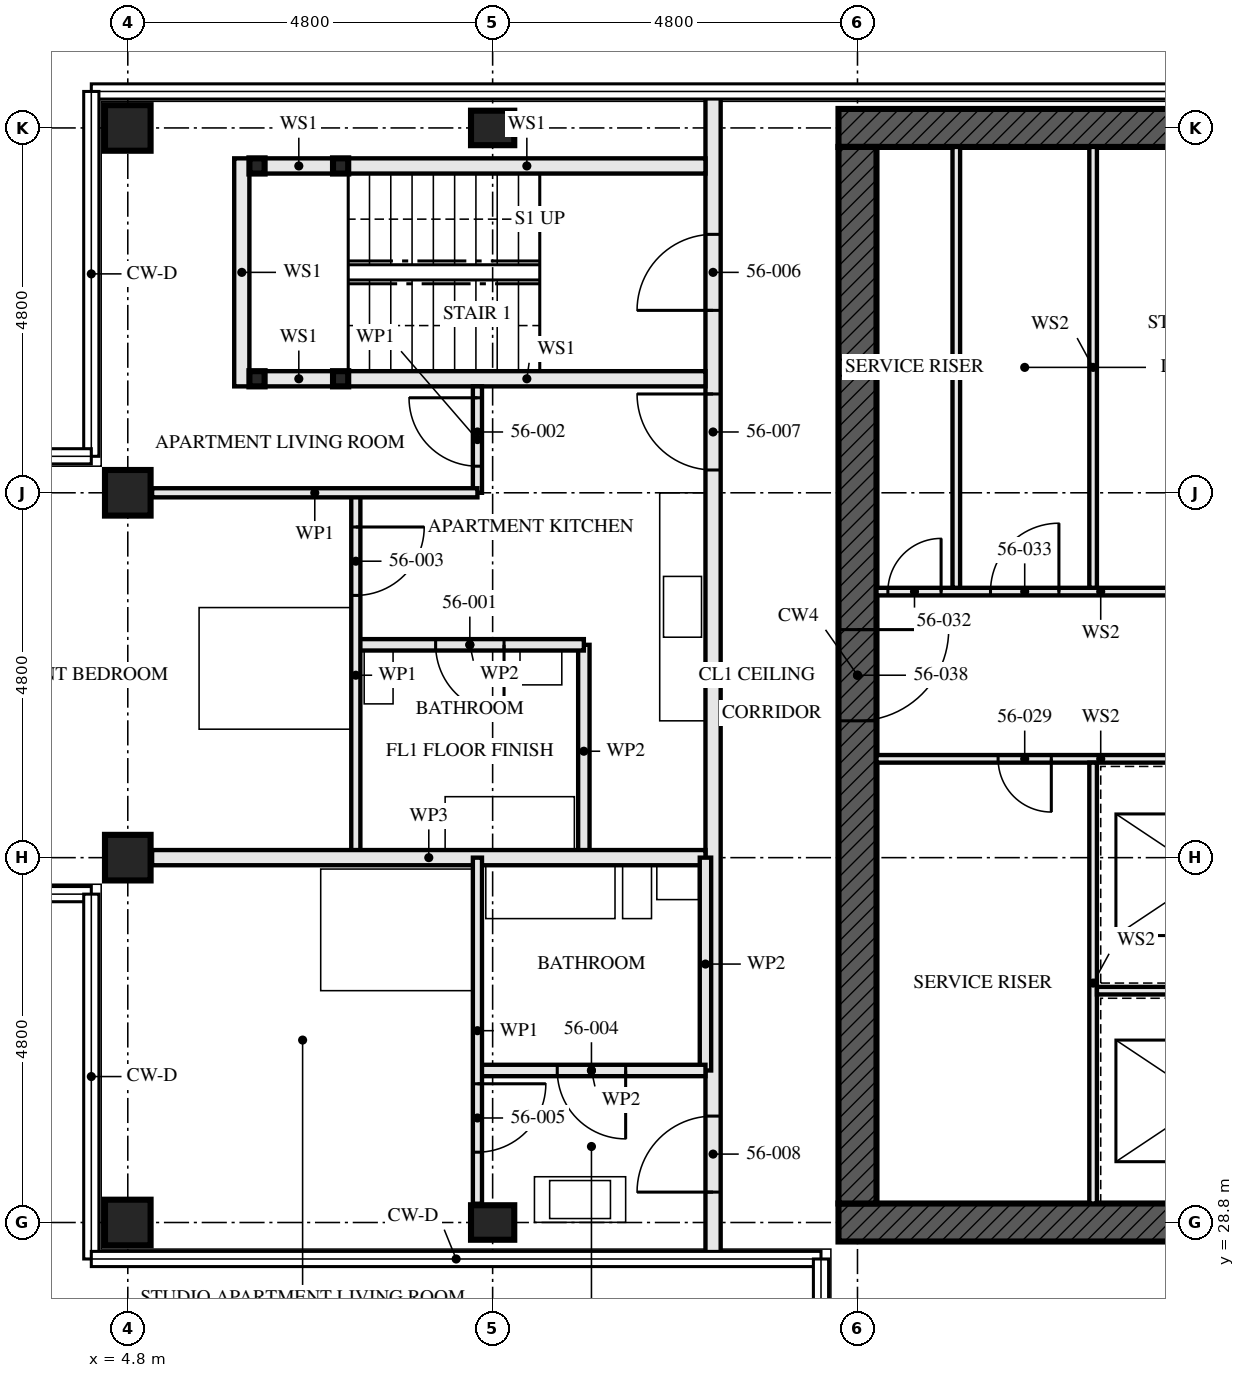
"""IFC4 building model, lengths in metres.
Left out: names, types, materials, properties, quantities, classifications, styles, units other than length and angle.
Written with IfcOpenShell. Run it as: python <this file> out.ifc"""

import sys

from ifc_helpers import new_model, si_unit, direction, frame, frame_2d, origin, origin_2d, place, context, subcontext, project, spatial, rectangle, hollow_rectangle, i_section, extrude, element, fill, save


model = new_model("IFC4")
c1 = context("Model", 3, precision=1e-05, world=origin(), true_north=direction((0.0, 1.0)))
c2 = subcontext(c1, "Body", "Model", "MODEL_VIEW")
j1 = project(units=[si_unit("LENGTHUNIT", "METRE"), si_unit("PLANEANGLEUNIT", "RADIAN")], contexts=[c1])
p1 = place(None, origin())
s1 = spatial("IfcSite", under=j1, at=p1, CompositionType="ELEMENT")
p2 = place(p1, origin())
s2 = spatial("IfcBuilding", under=s1, at=p2, CompositionType="ELEMENT")
p3 = place(p2, frame((0.0, 0.0, 205.0)))
s3 = spatial("IfcBuildingStorey", under=s2, at=p3, CompositionType="ELEMENT", Elevation=205.0)
for number, where, z_axis, x_axis in (
    (1, (4.8, 28.8, 0.0), (0.0, 0.0, 1.0), (0.0, 1.0, 0.0)),
    (2, (4.8, 33.6, 0.0), (0.0, 0.0, 1.0), (0.0, 1.0, 0.0)),
    (3, (4.8, 38.4, 0.0), (0.0, 0.0, 1.0), (0.0, 1.0, 0.0)),
    (4, (4.8, 43.2, 0.0), (0.0, 0.0, 1.0), (0.0, 1.0, 0.0)),
):
    element("IfcColumn", number, at=place(p3, frame(where, z_axis=z_axis, x_axis=x_axis)), inside=s3, PredefinedType="COLUMN", context=c2, shape_type="SweptSolid", body=[
        extrude(hollow_rectangle(XDim=0.6, YDim=0.6, WallThickness=0.05, at=origin_2d()), origin(), (0.0, 0.0, 1.0), 3.5),
    ])
for number, where, z_axis, x_axis in (
    (5, (9.6, 28.8, 0.0), (0.0, 0.0, 1.0), (0.0, 1.0, 0.0)),
    (6, (9.6, 43.2, 0.0), (0.0, 0.0, 1.0), (0.0, 1.0, 0.0)),
):
    element("IfcColumn", number, at=place(p3, frame(where, z_axis=z_axis, x_axis=x_axis)), inside=s3, PredefinedType="COLUMN", context=c2, shape_type="SweptSolid", body=[
        extrude(i_section(OverallWidth=0.454, OverallDepth=0.569, WebThickness=0.078, FlangeThickness=0.125, FilletRadius=0.015, at=origin_2d()), origin(), (0.0, 0.0, 1.0), 3.5),
    ])
p4 = place(p3, frame((14.15, 28.8, -0.17), z_axis=(0.0, 0.0, 1.0), x_axis=(1.0, 0.0, 0.0)))
e7 = element("IfcWall", 7, at=p4, inside=s3, PredefinedType="SHEAR", context=c2, shape_type="SweptSolid", body=[
    extrude(rectangle(XDim=14.9, YDim=0.5, at=frame_2d((7.45, 0.0))), origin(), (0.0, 0.0, 1.0), 3.5),
])
p5 = place(p4, frame((6.85, 0.0, 0.17)))
e8 = element("IfcOpeningElement", 8, at=p5, cuts=e7, PredefinedType="OPENING", context=c2, shape_type="SweptSolid", body=[
    extrude(rectangle(XDim=1.2, YDim=2.1, at=frame_2d((0.6, 1.05))), frame((0.0, 0.26, 0.0), z_axis=(0.0, -1.0, 0.0), x_axis=(1.0, 0.0, 0.0)), (0.0, 0.0, 1.0), 0.521),
])
p6 = place(p3, frame((29.05, 43.2, -0.17), z_axis=(0.0, 0.0, 1.0), x_axis=(-1.0, 0.0, 0.0)))
e9 = element("IfcWall", 9, at=p6, inside=s3, PredefinedType="SHEAR", context=c2, shape_type="SweptSolid", body=[
    extrude(rectangle(XDim=14.9, YDim=0.5, at=frame_2d((7.45, 0.0))), origin(), (0.0, 0.0, 1.0), 3.5),
])
p7 = place(p3, frame((14.4, 42.95, -0.17), z_axis=(0.0, 0.0, 1.0), x_axis=(0.0, -1.0, 0.0)))
e10 = element("IfcWall", 10, at=p7, inside=s3, PredefinedType="SHEAR", context=c2, shape_type="SweptSolid", body=[
    extrude(rectangle(XDim=13.9, YDim=0.5, at=frame_2d((6.95, 0.0))), origin(), (0.0, 0.0, 1.0), 3.5),
])
p8 = place(p7, frame((6.35, 0.0, 0.17)))
e11 = element("IfcOpeningElement", 11, at=p8, cuts=e10, PredefinedType="OPENING", context=c2, shape_type="SweptSolid", body=[
    extrude(rectangle(XDim=1.2, YDim=2.1, at=frame_2d((0.6, 1.05))), frame((0.0, 0.26, 0.0), z_axis=(0.0, -1.0, 0.0), x_axis=(1.0, 0.0, 0.0)), (0.0, 0.0, 1.0), 0.521),
])
for number, where, z_axis, x_axis in (
    (12, (6.5, 42.7, 0.0), (0.0, 0.0, 1.0), (1.0, 0.0, 0.0)),
    (13, (6.5, 39.9, 0.0), (0.0, 0.0, 1.0), (1.0, 0.0, 0.0)),
    (14, (7.6, 42.7, 0.0), (0.0, 0.0, 1.0), (1.0, 0.0, 0.0)),
    (15, (7.6, 39.9, 0.0), (0.0, 0.0, 1.0), (1.0, 0.0, 0.0)),
):
    element("IfcColumn", number, at=place(p3, frame(where, z_axis=z_axis, x_axis=x_axis)), inside=s3, PredefinedType="COLUMN", context=c2, shape_type="SweptSolid", body=[
        extrude(hollow_rectangle(XDim=0.2, YDim=0.2, WallThickness=0.008, at=origin_2d()), origin(), (0.0, 0.0, 1.0), 3.33),
    ])
p9 = place(p3, frame((6.6, 42.7, 0.0), z_axis=(0.0, 0.0, 1.0), x_axis=(1.0, 0.0, 0.0)))
e16 = element("IfcWall", 16, at=p9, inside=s3, PredefinedType="SOLIDWALL", context=c2, shape_type="SweptSolid", body=[
    extrude(rectangle(XDim=0.9, YDim=0.2, at=frame_2d((0.45, 0.0))), origin(), (0.0, 0.0, 1.0), 2.99),
])
p10 = place(p3, frame((7.7, 42.7, 0.0), z_axis=(0.0, 0.0, 1.0), x_axis=(1.0, 0.0, 0.0)))
e17 = element("IfcWall", 17, at=p10, inside=s3, PredefinedType="SOLIDWALL", context=c2, shape_type="SweptSolid", body=[
    extrude(rectangle(XDim=4.7, YDim=0.2, at=frame_2d((2.35, 0.0))), origin(), (0.0, 0.0, 1.0), 2.99),
])
p11 = place(p3, frame((6.6, 39.9, 0.0), z_axis=(0.0, 0.0, 1.0), x_axis=(1.0, 0.0, 0.0)))
e18 = element("IfcWall", 18, at=p11, inside=s3, PredefinedType="SOLIDWALL", context=c2, shape_type="SweptSolid", body=[
    extrude(rectangle(XDim=0.9, YDim=0.2, at=frame_2d((0.45, 0.0))), origin(), (0.0, 0.0, 1.0), 2.99),
])
p12 = place(p3, frame((7.7, 39.9, 0.0), z_axis=(0.0, 0.0, 1.0), x_axis=(1.0, 0.0, 0.0)))
e19 = element("IfcWall", 19, at=p12, inside=s3, PredefinedType="SOLIDWALL", context=c2, shape_type="SweptSolid", body=[
    extrude(rectangle(XDim=4.7, YDim=0.2, at=frame_2d((2.35, 0.0))), origin(), (0.0, 0.0, 1.0), 2.99),
])
p13 = place(p3, frame((6.3, 42.8, 0.0), z_axis=(0.0, 0.0, 1.0), x_axis=(0.0, -1.0, 0.0)))
e20 = element("IfcWall", 20, at=p13, inside=s3, PredefinedType="SOLIDWALL", context=c2, shape_type="SweptSolid", body=[
    extrude(rectangle(XDim=3.0, YDim=0.2, at=frame_2d((1.5, 0.0))), origin(), (0.0, 0.0, 1.0), 3.33),
])
p14 = place(p3, frame((7.8, 36.4, 0.0), z_axis=(0.0, 0.0, 1.0), x_axis=(1.0, 0.0, 0.0)))
e21 = element("IfcWall", 21, at=p14, inside=s3, PredefinedType="PARTITIONING", context=c2, shape_type="SweptSolid", body=[
    extrude(rectangle(XDim=3.0, YDim=0.15, at=frame_2d((1.5, 0.0))), origin(), (0.0, 0.0, 1.0), 3.33),
])
p15 = place(p14, frame((1.05, 0.0, 0.0)))
e22 = element("IfcOpeningElement", 22, at=p15, cuts=e21, PredefinedType="OPENING", context=c2, shape_type="SweptSolid", body=[
    extrude(rectangle(XDim=0.9, YDim=2.1, at=frame_2d((0.45, 1.05))), frame((0.0, 0.085, 0.0), z_axis=(0.0, -1.0, 0.0), x_axis=(1.0, 0.0, 0.0)), (0.0, 0.0, 1.0), 0.171),
])
p16 = place(p3, frame((10.8, 36.4, 0.0), z_axis=(0.0, 0.0, 1.0), x_axis=(0.0, -1.0, 0.0)))
e23 = element("IfcWall", 23, at=p16, inside=s3, PredefinedType="PARTITIONING", context=c2, shape_type="SweptSolid", body=[
    extrude(rectangle(XDim=2.8, YDim=0.15, at=frame_2d((1.4, 0.0))), origin(), (0.0, 0.0, 1.0), 3.33),
])
p17 = place(p3, frame((9.4, 39.8, 0.0), z_axis=(0.0, 0.0, 1.0), x_axis=(0.0, -1.0, 0.0)))
e24 = element("IfcWall", 24, at=p17, inside=s3, PredefinedType="PARTITIONING", context=c2, shape_type="SweptSolid", body=[
    extrude(rectangle(XDim=1.4, YDim=0.12, at=frame_2d((0.7, 0.0))), origin(), (0.0, 0.0, 1.0), 3.33),
])
p18 = place(p17, frame((0.15, 0.0, 0.0)))
e25 = element("IfcOpeningElement", 25, at=p18, cuts=e24, PredefinedType="OPENING", context=c2, shape_type="SweptSolid", body=[
    extrude(rectangle(XDim=0.9, YDim=2.1, at=frame_2d((0.45, 1.05))), frame((0.0, 0.071, 0.0), z_axis=(0.0, -1.0, 0.0), x_axis=(1.0, 0.0, 0.0)), (0.0, 0.0, 1.0), 0.141),
])
p19 = place(p3, frame((7.8, 38.4, 0.0), z_axis=(0.0, 0.0, 1.0), x_axis=(0.0, -1.0, 0.0)))
e26 = element("IfcWall", 26, at=p19, inside=s3, PredefinedType="PARTITIONING", context=c2, shape_type="SweptSolid", body=[
    extrude(rectangle(XDim=4.8, YDim=0.12, at=frame_2d((2.4, 0.0))), origin(), (0.0, 0.0, 1.0), 3.33),
])
p20 = place(p19, frame((0.45, 0.0, 0.0)))
e27 = element("IfcOpeningElement", 27, at=p20, cuts=e26, PredefinedType="OPENING", context=c2, shape_type="SweptSolid", body=[
    extrude(rectangle(XDim=0.9, YDim=2.1, at=frame_2d((0.45, 1.05))), frame((0.0, 0.071, 0.0), z_axis=(0.0, -1.0, 0.0), x_axis=(1.0, 0.0, 0.0)), (0.0, 0.0, 1.0), 0.141),
])
p21 = place(p3, frame((5.12, 38.4, 0.0), z_axis=(0.0, 0.0, 1.0), x_axis=(1.0, 0.0, 0.0)))
e28 = element("IfcWall", 28, at=p21, inside=s3, PredefinedType="PARTITIONING", context=c2, shape_type="SweptSolid", body=[
    extrude(rectangle(XDim=4.28, YDim=0.12, at=frame_2d((2.14, 0.0))), origin(), (0.0, 0.0, 1.0), 2.55),
])
p22 = place(p3, frame((5.12, 33.6, 0.0), z_axis=(0.0, 0.0, 1.0), x_axis=(1.0, 0.0, 0.0)))
e29 = element("IfcWall", 29, at=p22, inside=s3, PredefinedType="PARTITIONING", context=c2, shape_type="SweptSolid", body=[
    extrude(rectangle(XDim=7.28, YDim=0.2, at=frame_2d((3.64, 0.0))), origin(), (0.0, 0.0, 1.0), 2.55),
])
p23 = place(p3, frame((9.4, 30.8, 0.0), z_axis=(0.0, 0.0, 1.0), x_axis=(1.0, 0.0, 0.0)))
e30 = element("IfcWall", 30, at=p23, inside=s3, PredefinedType="PARTITIONING", context=c2, shape_type="SweptSolid", body=[
    extrude(rectangle(XDim=3.0, YDim=0.15, at=frame_2d((1.5, 0.0))), origin(), (0.0, 0.0, 1.0), 3.33),
])
p24 = place(p23, frame((1.05, 0.0, 0.0)))
e31 = element("IfcOpeningElement", 31, at=p24, cuts=e30, PredefinedType="OPENING", context=c2, shape_type="SweptSolid", body=[
    extrude(rectangle(XDim=0.9, YDim=2.1, at=frame_2d((0.45, 1.05))), frame((0.0, 0.085, 0.0), z_axis=(0.0, -1.0, 0.0), x_axis=(1.0, 0.0, 0.0)), (0.0, 0.0, 1.0), 0.171),
])
p25 = place(p3, frame((12.4, 33.6, 0.0), z_axis=(0.0, 0.0, 1.0), x_axis=(0.0, -1.0, 0.0)))
e32 = element("IfcWall", 32, at=p25, inside=s3, PredefinedType="PARTITIONING", context=c2, shape_type="SweptSolid", body=[
    extrude(rectangle(XDim=2.8, YDim=0.15, at=frame_2d((1.4, 0.0))), origin(), (0.0, 0.0, 1.0), 3.33),
])
p26 = place(p3, frame((9.4, 33.6, 0.0), z_axis=(0.0, 0.0, 1.0), x_axis=(0.0, -1.0, 0.0)))
e33 = element("IfcWall", 33, at=p26, inside=s3, PredefinedType="PARTITIONING", context=c2, shape_type="SweptSolid", body=[
    extrude(rectangle(XDim=4.553, YDim=0.12, at=frame_2d((2.276, 0.0))), origin(), (0.0, 0.0, 1.0), 3.33),
])
p27 = place(p26, frame((2.975, 0.0, 0.0)))
e34 = element("IfcOpeningElement", 34, at=p27, cuts=e33, PredefinedType="OPENING", context=c2, shape_type="SweptSolid", body=[
    extrude(rectangle(XDim=0.9, YDim=2.1, at=frame_2d((0.45, 1.05))), frame((0.0, 0.071, 0.0), z_axis=(0.0, -1.0, 0.0), x_axis=(1.0, 0.0, 0.0)), (0.0, 0.0, 1.0), 0.141),
])
p28 = place(p3, frame((12.5, 43.655, 0.0), z_axis=(0.0, 0.0, 1.0), x_axis=(0.0, -1.0, 0.0)))
e35 = element("IfcWall", 35, at=p28, inside=s3, PredefinedType="PARTITIONING", context=c2, shape_type="SweptSolid", body=[
    extrude(rectangle(XDim=15.31, YDim=0.2, at=frame_2d((7.655, 0.0))), origin(), (0.0, 0.0, 1.0), 2.32),
])
p29 = place(p28, frame((1.855, 0.0, 0.0)))
e36 = element("IfcOpeningElement", 36, at=p29, cuts=e35, PredefinedType="OPENING", context=c2, shape_type="SweptSolid", body=[
    extrude(rectangle(XDim=1.0, YDim=2.1, at=frame_2d((0.5, 1.05))), frame((0.0, 0.111, 0.0), z_axis=(0.0, -1.0, 0.0), x_axis=(1.0, 0.0, 0.0)), (0.0, 0.0, 1.0), 0.221),
])
p30 = place(p28, frame((3.955, 0.0, 0.0)))
e37 = element("IfcOpeningElement", 37, at=p30, cuts=e35, PredefinedType="OPENING", context=c2, shape_type="SweptSolid", body=[
    extrude(rectangle(XDim=1.0, YDim=2.1, at=frame_2d((0.5, 1.05))), frame((0.0, 0.111, 0.0), z_axis=(0.0, -1.0, 0.0), x_axis=(1.0, 0.0, 0.0)), (0.0, 0.0, 1.0), 0.221),
])
p31 = place(p28, frame((13.455, 0.0, 0.0)))
e38 = element("IfcOpeningElement", 38, at=p31, cuts=e35, PredefinedType="OPENING", context=c2, shape_type="SweptSolid", body=[
    extrude(rectangle(XDim=1.0, YDim=2.1, at=frame_2d((0.5, 1.05))), frame((0.0, 0.111, 0.0), z_axis=(0.0, -1.0, 0.0), x_axis=(1.0, 0.0, 0.0)), (0.0, 0.0, 1.0), 0.221),
])
p32 = place(p3, frame((15.7, 37.15, 0.0), z_axis=(0.0, 0.0, 1.0), x_axis=(0.0, 1.0, 0.0)))
e39 = element("IfcWall", 39, at=p32, inside=s3, PredefinedType="SOLIDWALL", context=c2, shape_type="SweptSolid", body=[
    extrude(rectangle(XDim=5.8, YDim=0.1, at=frame_2d((2.9, 0.0))), origin(), (0.0, 0.0, 1.0), 3.33),
])
p33 = place(p3, frame((14.65, 34.9, 0.0), z_axis=(0.0, 0.0, 1.0), x_axis=(1.0, 0.0, 0.0)))
e40 = element("IfcWall", 40, at=p33, inside=s3, PredefinedType="SOLIDWALL", context=c2, shape_type="SweptSolid", body=[
    extrude(rectangle(XDim=5.9, YDim=0.1, at=frame_2d((2.95, 0.0))), origin(), (0.0, 0.0, 1.0), 3.33),
])
p34 = place(p33, frame((1.6, 0.0, 0.0)))
e41 = element("IfcOpeningElement", 41, at=p34, cuts=e40, PredefinedType="OPENING", context=c2, shape_type="SweptSolid", body=[
    extrude(rectangle(XDim=0.7, YDim=2.1, at=frame_2d((0.35, 1.05))), frame((0.0, 0.061, 0.0), z_axis=(0.0, -1.0, 0.0), x_axis=(1.0, 0.0, 0.0)), (0.0, 0.0, 1.0), 0.121),
])
p35 = place(p3, frame((14.65, 37.1, 0.0), z_axis=(0.0, 0.0, 1.0), x_axis=(1.0, 0.0, 0.0)))
e42 = element("IfcWall", 42, at=p35, inside=s3, PredefinedType="SOLIDWALL", context=c2, shape_type="SweptSolid", body=[
    extrude(rectangle(XDim=5.9, YDim=0.1, at=frame_2d((2.95, 0.0))), origin(), (0.0, 0.0, 1.0), 3.33),
])
p36 = place(p35, frame((0.15, 0.0, 0.0)))
e43 = element("IfcOpeningElement", 43, at=p36, cuts=e42, PredefinedType="OPENING", context=c2, shape_type="SweptSolid", body=[
    extrude(rectangle(XDim=0.7, YDim=2.1, at=frame_2d((0.35, 1.05))), frame((0.0, 0.061, 0.0), z_axis=(0.0, -1.0, 0.0), x_axis=(1.0, 0.0, 0.0)), (0.0, 0.0, 1.0), 0.121),
])
p37 = place(p35, frame((1.5, 0.0, 0.0)))
e44 = element("IfcOpeningElement", 44, at=p37, cuts=e42, PredefinedType="OPENING", context=c2, shape_type="SweptSolid", body=[
    extrude(rectangle(XDim=0.9, YDim=2.1, at=frame_2d((0.45, 1.05))), frame((0.0, 0.061, 0.0), z_axis=(0.0, -1.0, 0.0), x_axis=(1.0, 0.0, 0.0)), (0.0, 0.0, 1.0), 0.121),
])
p38 = place(p3, frame((17.5, 29.05, 0.0), z_axis=(0.0, 0.0, 1.0), x_axis=(0.0, 1.0, 0.0)))
e45 = element("IfcWall", 45, at=p38, inside=s3, PredefinedType="SOLIDWALL", context=c2, shape_type="SweptSolid", body=[
    extrude(rectangle(XDim=5.8, YDim=0.1, at=frame_2d((2.9, 0.0))), origin(), (0.0, 0.0, 1.0), 3.33),
])
p39 = place(p3, frame((17.55, 31.85, 0.0), z_axis=(0.0, 0.0, 1.0), x_axis=(1.0, 0.0, 0.0)))
e46 = element("IfcWall", 46, at=p39, inside=s3, PredefinedType="SOLIDWALL", context=c2, shape_type="SweptSolid", body=[
    extrude(rectangle(XDim=2.9, YDim=0.1, at=frame_2d((1.45, 0.0))), origin(), (0.0, 0.0, 1.0), 3.33),
])
p40 = place(p3, frame((17.5, 37.15, 0.0), z_axis=(0.0, 0.0, 1.0), x_axis=(0.0, 1.0, 0.0)))
e47 = element("IfcWall", 47, at=p40, inside=s3, PredefinedType="SOLIDWALL", context=c2, shape_type="SweptSolid", body=[
    extrude(rectangle(XDim=5.8, YDim=0.1, at=frame_2d((2.9, 0.0))), origin(), (0.0, 0.0, 1.0), 3.33),
])
p41 = place(p15, frame((0.9, 0.0, 0.0), z_axis=(0.0, 0.0, 1.0), x_axis=(-1.0, 0.0, 0.0)))
e48 = element("IfcDoor", 48, at=p41, inside=s3, OperationType="SINGLE_SWING_RIGHT", PredefinedType="DOOR", context=c2, shape_type="SweptSolid", body=[
    extrude(rectangle(XDim=0.9, YDim=2.1, at=frame_2d((0.45, 1.05))), frame((0.0, 0.022, 0.0), z_axis=(0.0, -1.0, 0.0), x_axis=(1.0, 0.0, 0.0)), (0.0, 0.0, 1.0), 0.044),
])
fill(e22, e48)
p42 = place(p18, frame((0.9, 0.0, 0.0), z_axis=(0.0, 0.0, 1.0), x_axis=(-1.0, 0.0, 0.0)))
e49 = element("IfcDoor", 49, at=p42, inside=s3, OperationType="SINGLE_SWING_LEFT", PredefinedType="DOOR", context=c2, shape_type="SweptSolid", body=[
    extrude(rectangle(XDim=0.9, YDim=2.1, at=frame_2d((0.45, 1.05))), frame((0.0, 0.022, 0.0), z_axis=(0.0, -1.0, 0.0), x_axis=(1.0, 0.0, 0.0)), (0.0, 0.0, 1.0), 0.044),
])
fill(e25, e49)
p43 = place(p20, origin())
e50 = element("IfcDoor", 50, at=p43, inside=s3, OperationType="SINGLE_SWING_RIGHT", PredefinedType="DOOR", context=c2, shape_type="SweptSolid", body=[
    extrude(rectangle(XDim=0.9, YDim=2.1, at=frame_2d((0.45, 1.05))), frame((0.0, 0.022, 0.0), z_axis=(0.0, -1.0, 0.0), x_axis=(1.0, 0.0, 0.0)), (0.0, 0.0, 1.0), 0.044),
])
fill(e27, e50)
p44 = place(p24, frame((0.9, 0.0, 0.0), z_axis=(0.0, 0.0, 1.0), x_axis=(-1.0, 0.0, 0.0)))
e51 = element("IfcDoor", 51, at=p44, inside=s3, OperationType="SINGLE_SWING_RIGHT", PredefinedType="DOOR", context=c2, shape_type="SweptSolid", body=[
    extrude(rectangle(XDim=0.9, YDim=2.1, at=frame_2d((0.45, 1.05))), frame((0.0, 0.022, 0.0), z_axis=(0.0, -1.0, 0.0), x_axis=(1.0, 0.0, 0.0)), (0.0, 0.0, 1.0), 0.044),
])
fill(e31, e51)
p45 = place(p27, origin())
e52 = element("IfcDoor", 52, at=p45, inside=s3, OperationType="SINGLE_SWING_RIGHT", PredefinedType="DOOR", context=c2, shape_type="SweptSolid", body=[
    extrude(rectangle(XDim=0.9, YDim=2.1, at=frame_2d((0.45, 1.05))), frame((0.0, 0.022, 0.0), z_axis=(0.0, -1.0, 0.0), x_axis=(1.0, 0.0, 0.0)), (0.0, 0.0, 1.0), 0.044),
])
fill(e34, e52)
p46 = place(p29, frame((1.0, 0.0, 0.0), z_axis=(0.0, 0.0, 1.0), x_axis=(-1.0, 0.0, 0.0)))
e53 = element("IfcDoor", 53, at=p46, inside=s3, OperationType="SINGLE_SWING_RIGHT", PredefinedType="DOOR", context=c2, shape_type="SweptSolid", body=[
    extrude(rectangle(XDim=1.0, YDim=2.1, at=frame_2d((0.5, 1.05))), frame((0.0, 0.032, 0.0), z_axis=(0.0, -1.0, 0.0), x_axis=(1.0, 0.0, 0.0)), (0.0, 0.0, 1.0), 0.064),
])
fill(e36, e53)
p47 = place(p30, frame((1.0, 0.0, 0.0), z_axis=(0.0, 0.0, 1.0), x_axis=(-1.0, 0.0, 0.0)))
e54 = element("IfcDoor", 54, at=p47, inside=s3, OperationType="SINGLE_SWING_LEFT", PredefinedType="DOOR", context=c2, shape_type="SweptSolid", body=[
    extrude(rectangle(XDim=1.0, YDim=2.1, at=frame_2d((0.5, 1.05))), frame((0.0, 0.027, 0.0), z_axis=(0.0, -1.0, 0.0), x_axis=(1.0, 0.0, 0.0)), (0.0, 0.0, 1.0), 0.054),
])
fill(e37, e54)
p48 = place(p31, frame((1.0, 0.0, 0.0), z_axis=(0.0, 0.0, 1.0), x_axis=(-1.0, 0.0, 0.0)))
e55 = element("IfcDoor", 55, at=p48, inside=s3, OperationType="SINGLE_SWING_RIGHT", PredefinedType="DOOR", context=c2, shape_type="SweptSolid", body=[
    extrude(rectangle(XDim=1.0, YDim=2.1, at=frame_2d((0.5, 1.05))), frame((0.0, 0.027, 0.0), z_axis=(0.0, -1.0, 0.0), x_axis=(1.0, 0.0, 0.0)), (0.0, 0.0, 1.0), 0.054),
])
fill(e38, e55)
p49 = place(p34, frame((0.7, 0.0, 0.0), z_axis=(0.0, 0.0, 1.0), x_axis=(-1.0, 0.0, 0.0)))
e56 = element("IfcDoor", 56, at=p49, inside=s3, OperationType="SINGLE_SWING_RIGHT", PredefinedType="DOOR", context=c2, shape_type="SweptSolid", body=[
    extrude(rectangle(XDim=0.7, YDim=2.1, at=frame_2d((0.35, 1.05))), frame((0.0, 0.027, 0.0), z_axis=(0.0, -1.0, 0.0), x_axis=(1.0, 0.0, 0.0)), (0.0, 0.0, 1.0), 0.054),
])
fill(e41, e56)
p50 = place(p36, origin())
e57 = element("IfcDoor", 57, at=p50, inside=s3, OperationType="SINGLE_SWING_LEFT", PredefinedType="DOOR", context=c2, shape_type="SweptSolid", body=[
    extrude(rectangle(XDim=0.7, YDim=2.1, at=frame_2d((0.35, 1.05))), frame((0.0, 0.027, 0.0), z_axis=(0.0, -1.0, 0.0), x_axis=(1.0, 0.0, 0.0)), (0.0, 0.0, 1.0), 0.054),
])
fill(e43, e57)
p51 = place(p37, origin())
e58 = element("IfcDoor", 58, at=p51, inside=s3, OperationType="SINGLE_SWING_LEFT", PredefinedType="DOOR", context=c2, shape_type="SweptSolid", body=[
    extrude(rectangle(XDim=0.9, YDim=2.1, at=frame_2d((0.45, 1.05))), frame((0.0, 0.027, 0.0), z_axis=(0.0, -1.0, 0.0), x_axis=(1.0, 0.0, 0.0)), (0.0, 0.0, 1.0), 0.054),
])
fill(e44, e58)
p52 = place(p8, origin())
e59 = element("IfcDoor", 59, at=p52, inside=s3, OperationType="SINGLE_SWING_LEFT", PredefinedType="DOOR", context=c2, shape_type="SweptSolid", body=[
    extrude(rectangle(XDim=1.2, YDim=2.1, at=frame_2d((0.6, 1.05))), frame((0.0, 0.027, 0.0), z_axis=(0.0, -1.0, 0.0), x_axis=(1.0, 0.0, 0.0)), (0.0, 0.0, 1.0), 0.054),
])
fill(e11, e59)
save(model, sys.argv[1])
